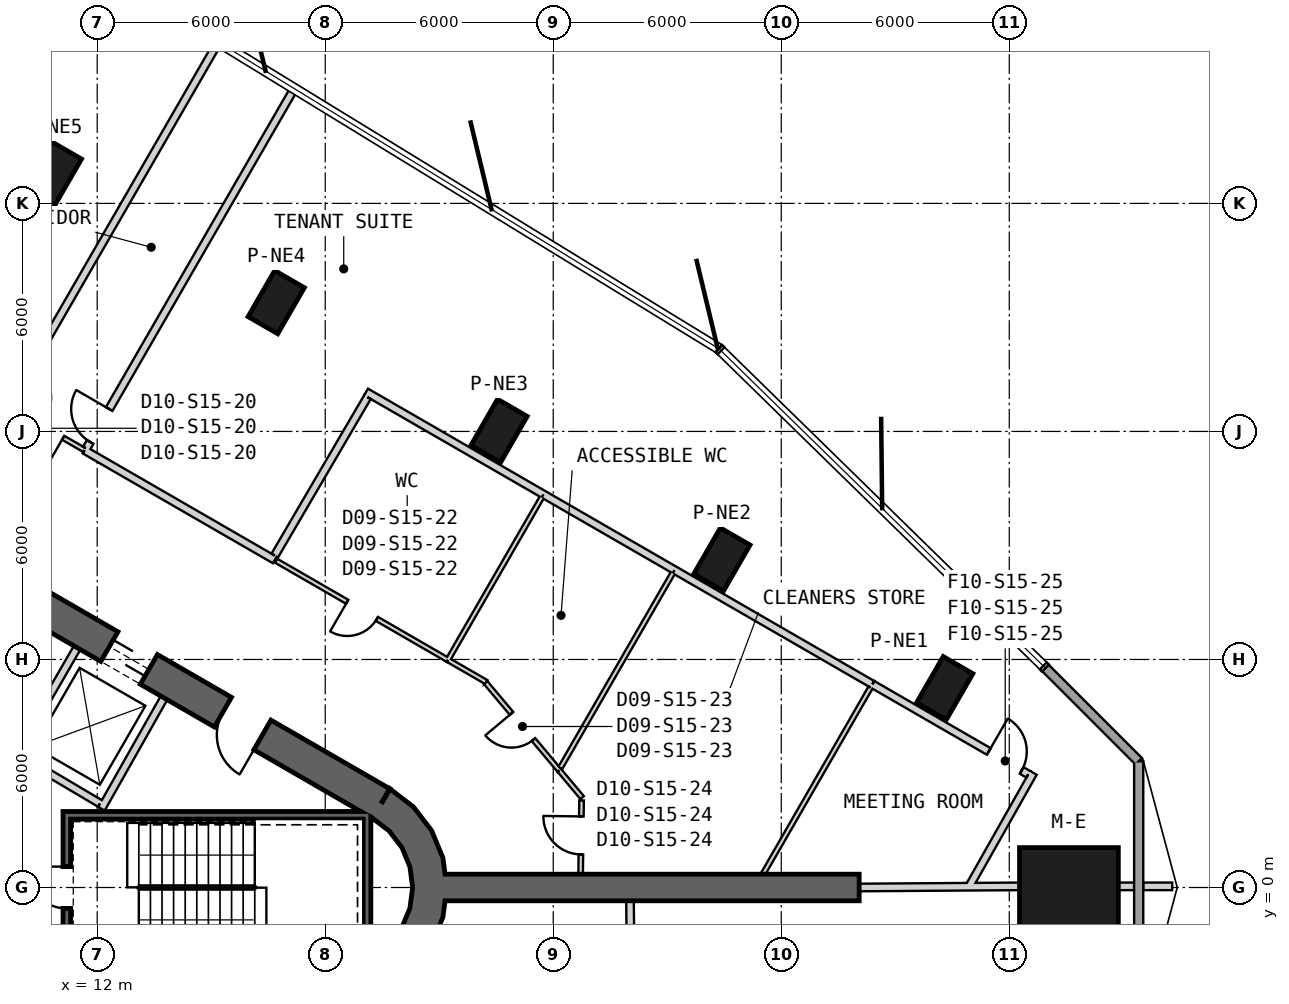
"""IFC4 building model, lengths in metres.
Left out: names, types, materials, properties, quantities, classifications, styles, units other than length and angle.
Written with IfcOpenShell. Run it as: python <this file> out.ifc"""

import sys

from ifc_helpers import new_model, si_unit, direction, frame, frame_2d, origin, origin_2d, place, context, subcontext, project, spatial, polyline, rectangle, outline, extrude, element, fill, save


model = new_model("IFC4")
c1 = context("Model", 3, precision=1e-05, world=origin(), true_north=direction((0.0, 1.0)))
c2 = subcontext(c1, "Body", "Model", "MODEL_VIEW")
j1 = project(units=[si_unit("LENGTHUNIT", "METRE"), si_unit("PLANEANGLEUNIT", "RADIAN")], contexts=[c1])
p1 = place(None, origin())
s1 = spatial("IfcSite", under=j1, at=p1, CompositionType="ELEMENT")
p2 = place(p1, origin())
s2 = spatial("IfcBuilding", under=s1, at=p2, CompositionType="ELEMENT")
p3 = place(p2, frame((0.0, 0.0, 241.2)))
s3 = spatial("IfcBuildingStorey", under=s2, at=p3, CompositionType="ELEMENT", Elevation=241.2)
p4 = place(p3, frame((37.57, 0.0, 0.0), z_axis=(0.0, 0.0, 1.0), x_axis=(1.0, 0.0, 0.0)))
e1 = element("IfcColumn", 1, at=p4, inside=s3, PredefinedType="COLUMN", context=c2, shape_type="SweptSolid", body=[
    extrude(rectangle(XDim=2.6, YDim=2.1, at=origin_2d()), origin(), (0.0, 0.0, 1.0), 4.0),
])
for number, where, z_axis, x_axis in (
    (2, (34.302, 5.245, 0.0), (0.0, 0.0, 1.0), (0.5, 0.866, 0.0)),
    (3, (28.438, 8.631, 0.0), (0.0, 0.0, 1.0), (0.5, 0.866, 0.0)),
    (4, (22.574, 12.016, 0.0), (0.0, 0.0, 1.0), (0.5, 0.866, 0.0)),
    (5, (16.71, 15.401, 0.0), (0.0, 0.0, 1.0), (0.5, 0.866, 0.0)),
    (6, (10.847, 18.787, 0.0), (0.0, 0.0, 1.0), (0.5, 0.866, 0.0)),
):
    element("IfcColumn", number, at=place(p3, frame(where, z_axis=z_axis, x_axis=x_axis)), inside=s3, PredefinedType="COLUMN", context=c2, shape_type="SweptSolid", body=[
        extrude(rectangle(XDim=1.4, YDim=0.9, at=origin_2d()), origin(), (0.0, 0.0, 1.0), 4.0),
    ])
p5 = place(p3, frame((19.475, 2.208, 0.0), z_axis=(0.0, 0.0, 1.0), x_axis=(-0.866028369851, 0.499994862586, 0.0)))
e7 = element("IfcWall", 7, at=p5, inside=s3, PredefinedType="SHEAR", context=c2, shape_type="SweptSolid", body=[
    extrude(rectangle(XDim=31.523, YDim=0.9, at=frame_2d((15.762, 0.0))), origin(), (0.0, 0.0, 1.0), 4.0),
])
p6 = place(p5, frame((7.062, 0.0, 0.0)))
e8 = element("IfcOpeningElement", 8, at=p6, cuts=e7, PredefinedType="OPENING", context=c2, shape_type="SweptSolid", body=[
    extrude(rectangle(XDim=1.2, YDim=2.4, at=frame_2d((0.6, 1.2))), frame((0.0, 0.46, 0.0), z_axis=(0.0, -1.0, 0.0), x_axis=(1.0, 0.0, 0.0)), (0.0, 0.0, 1.0), 0.92),
])
p7 = place(p5, frame((3.612, 0.0, 0.0)))
e9 = element("IfcOpeningElement", 9, at=p7, cuts=e7, PredefinedType="OPENING", context=c2, shape_type="SweptSolid", body=[
    extrude(rectangle(XDim=1.2, YDim=2.4, at=frame_2d((0.6, 1.2))), frame((0.0, 0.46, 0.0), z_axis=(0.0, -1.0, 0.0), x_axis=(1.0, 0.0, 0.0)), (0.0, 0.0, 1.0), 0.92),
])
p8 = place(p5, frame((26.712, 0.0, 0.0)))
e10 = element("IfcOpeningElement", 10, at=p8, cuts=e7, PredefinedType="OPENING", context=c2, shape_type="SweptSolid", body=[
    extrude(rectangle(XDim=1.2, YDim=2.4, at=frame_2d((0.6, 1.2))), frame((0.0, 0.46, 0.0), z_axis=(0.0, -1.0, 0.0), x_axis=(1.0, 0.0, 0.0)), (0.0, 0.0, 1.0), 0.92),
])
p9 = place(p3, origin())
e11 = element("IfcWall", 11, at=p9, inside=s3, PredefinedType="SHEAR", context=c2, shape_type="SweptSolid", body=[
    extrude(outline(polyline([(19.7, -2.598), (20.321, -2.121), (20.798, -1.5), (21.098, -0.777), (21.2, 0.0), (21.098, 0.777), (20.798, 1.5), (20.321, 2.121), (19.7, 2.598), (19.25, 1.819), (19.685, 1.485), (20.019, 1.05), (20.229, 0.543), (20.3, 0.0), (20.229, -0.543), (20.019, -1.05), (19.685, -1.485), (19.25, -1.819), (19.7, -2.598)])), origin(), (0.0, 0.0, 1.0), 4.0),
])
p10 = place(p3, frame((21.15, 0.0, 0.0), z_axis=(0.0, 0.0, 1.0), x_axis=(1.0, 0.0, 0.0)))
e12 = element("IfcWall", 12, at=p10, inside=s3, PredefinedType="SHEAR", context=c2, shape_type="SweptSolid", body=[
    extrude(rectangle(XDim=10.9, YDim=0.7, at=frame_2d((5.45, 0.0))), origin(), (0.0, 0.0, 1.0), 4.0),
])
p11 = place(p3, frame((39.406, -3.321, 0.0), z_axis=(0.0, 0.0, 1.0), x_axis=(0.0, 1.0, 0.0)))
e13 = element("IfcWall", 13, at=p11, inside=s3, PredefinedType="SOLIDWALL", context=c2, shape_type="SweptSolid", body=[
    extrude(rectangle(XDim=6.643, YDim=0.24, at=frame_2d((3.321, 0.0))), origin(), (0.0, 0.0, 1.0), 3.7),
])
p12 = place(p3, frame((39.406, 3.321, 0.0), z_axis=(0.0, 0.0, 1.0), x_axis=(-0.707106781187, 0.707106781187, 0.0)))
e14 = element("IfcWall", 14, at=p12, inside=s3, PredefinedType="SOLIDWALL", context=c2, shape_type="SweptSolid", body=[
    extrude(rectangle(XDim=3.47, YDim=0.24, at=frame_2d((1.735, 0.0))), origin(), (0.0, 0.0, 1.0), 3.7),
])
p13 = place(p3, frame((9.847, 3.495, 0.0), z_axis=(0.0, 0.0, 1.0), x_axis=(0.499984717929, 0.866034226713, 0.0)))
e15 = element("IfcWall", 15, at=p13, inside=s3, PredefinedType="PLUMBINGWALL", context=c2, shape_type="SweptSolid", body=[
    extrude(rectangle(XDim=3.25, YDim=0.2, at=frame_2d((1.625, 0.0))), origin(), (0.0, 0.0, 1.0), 3.7),
])
p14 = place(p3, frame((12.11, 2.073, 0.0), z_axis=(0.0, 0.0, 1.0), x_axis=(0.49196600604, 0.870614408852, 0.0)))
e16 = element("IfcWall", 16, at=p14, inside=s3, PredefinedType="PLUMBINGWALL", context=c2, shape_type="SweptSolid", body=[
    extrude(rectangle(XDim=3.35, YDim=0.2, at=frame_2d((1.675, 0.0))), origin(), (0.0, 0.0, 1.0), 3.7),
])
p15 = place(p3, frame((12.073, 2.211, 0.0), z_axis=(0.0, 0.0, 1.0), x_axis=(-0.860414880418, 0.509594185166, 0.0)))
e17 = element("IfcWall", 17, at=p15, inside=s3, PredefinedType="PLUMBINGWALL", context=c2, shape_type="SweptSolid", body=[
    extrude(rectangle(XDim=2.7, YDim=0.2, at=frame_2d((1.35, 0.0))), origin(), (0.0, 0.0, 1.0), 3.7),
])
p16 = place(p3, frame((19.2, 1.9, -0.3), z_axis=(0.0, 0.0, 1.0), x_axis=(-1.0, 0.0, 0.0)))
e18 = element("IfcWall", 18, at=p16, inside=s3, PredefinedType="SHEAR", context=c2, shape_type="SweptSolid", body=[
    extrude(rectangle(XDim=8.1, YDim=0.2, at=frame_2d((4.05, 0.0))), origin(), (0.0, 0.0, 1.0), 4.0),
])
p17 = place(p3, frame((19.1, -2.0, -0.3), z_axis=(0.0, 0.0, 1.0), x_axis=(0.0, 1.0, 0.0)))
e19 = element("IfcWall", 19, at=p17, inside=s3, PredefinedType="SHEAR", context=c2, shape_type="SweptSolid", body=[
    extrude(rectangle(XDim=3.8, YDim=0.2, at=frame_2d((1.9, 0.0))), origin(), (0.0, 0.0, 1.0), 4.0),
])
p18 = place(p3, frame((11.2, -1.8, -0.3), z_axis=(0.0, 0.0, 1.0), x_axis=(0.0, 1.0, 0.0)))
e20 = element("IfcWall", 20, at=p18, inside=s3, PredefinedType="SHEAR", context=c2, shape_type="SweptSolid", body=[
    extrude(rectangle(XDim=3.6, YDim=0.2, at=frame_2d((1.8, 0.0))), origin(), (0.0, 0.0, 1.0), 4.0),
])
p19 = place(p18, frame((1.25, 0.0, 0.3)))
e21 = element("IfcOpeningElement", 21, at=p19, cuts=e20, PredefinedType="OPENING", context=c2, shape_type="SweptSolid", body=[
    extrude(rectangle(XDim=1.1, YDim=2.1, at=frame_2d((0.55, 1.05))), frame((0.0, 0.11, 0.0), z_axis=(0.0, -1.0, 0.0), x_axis=(1.0, 0.0, 0.0)), (0.0, 0.0, 1.0), 0.22),
])
p20 = place(p3, frame((22.236, 5.406, 0.0), z_axis=(0.0, 0.0, 1.0), x_axis=(-0.866024722723, 0.500001179632, 0.0)))
e22 = element("IfcWall", 22, at=p20, inside=s3, PredefinedType="PARTITIONING", context=c2, shape_type="SweptSolid", body=[
    extrude(rectangle(XDim=1.163, YDim=0.12, at=frame_2d((0.581, 0.0))), origin(), (0.0, 0.0, 1.0), 3.7),
])
p21 = place(p3, frame((21.229, 5.988, 0.0), z_axis=(0.0, 0.0, 1.0), x_axis=(-0.866024383922, 0.50000176645, 0.0)))
e23 = element("IfcWall", 23, at=p21, inside=s3, PredefinedType="PARTITIONING", context=c2, shape_type="SweptSolid", body=[
    extrude(rectangle(XDim=5.221, YDim=0.12, at=frame_2d((2.61, 0.0))), origin(), (0.0, 0.0, 1.0), 2.98),
])
p22 = place(p21, frame((2.16, 0.0, 0.0)))
e24 = element("IfcOpeningElement", 24, at=p22, cuts=e23, PredefinedType="OPENING", context=c2, shape_type="SweptSolid", body=[
    extrude(rectangle(XDim=0.9, YDim=2.1, at=frame_2d((0.45, 1.05))), frame((0.0, 0.07, 0.0), z_axis=(0.0, -1.0, 0.0), x_axis=(1.0, 0.0, 0.0)), (0.0, 0.0, 1.0), 0.14),
])
p23 = place(p3, frame((11.667, 11.508, 0.0), z_axis=(0.0, 0.0, 1.0), x_axis=(-0.866053019151, 0.499952165731, 0.0)))
e25 = element("IfcWall", 25, at=p23, inside=s3, PredefinedType="PARTITIONING", context=c2, shape_type="SweptSolid", body=[
    extrude(rectangle(XDim=2.3, YDim=0.12, at=frame_2d((1.15, 0.0))), origin(), (0.0, 0.0, 1.0), 3.7),
])
p24 = place(p23, frame((0.65, 0.0, 0.0)))
e26 = element("IfcOpeningElement", 26, at=p24, cuts=e25, PredefinedType="OPENING", context=c2, shape_type="SweptSolid", body=[
    extrude(rectangle(XDim=1.0, YDim=2.1, at=frame_2d((0.5, 1.05))), frame((0.0, 0.07, 0.0), z_axis=(0.0, -1.0, 0.0), x_axis=(1.0, 0.0, 0.0)), (0.0, 0.0, 1.0), 0.14),
])
p25 = place(p3, frame((16.673, 8.618, 0.0), z_axis=(0.0, 0.0, 1.0), x_axis=(-0.866014659605, 0.500018609004, 0.0)))
e27 = element("IfcWall", 27, at=p25, inside=s3, PredefinedType="PARTITIONING", context=c2, shape_type="SweptSolid", body=[
    extrude(rectangle(XDim=5.78, YDim=0.2, at=frame_2d((2.89, 0.0))), origin(), (0.0, 0.0, 1.0), 2.98),
])
p26 = place(p3, frame((24.76, 2.365, 0.0), z_axis=(0.0, 0.0, 1.0), x_axis=(-0.642800124371, 0.766033941878, 0.0)))
e28 = element("IfcWall", 28, at=p26, inside=s3, PredefinedType="PARTITIONING", context=c2, shape_type="SweptSolid", body=[
    extrude(rectangle(XDim=0.935, YDim=0.12, at=frame_2d((0.468, 0.0))), origin(), (0.0, 0.0, 1.0), 3.7),
])
p27 = place(p3, frame((24.159, 3.082, 0.0), z_axis=(0.0, 0.0, 1.0), x_axis=(-0.642770249036, 0.766059010099, 0.0)))
e29 = element("IfcWall", 29, at=p27, inside=s3, PredefinedType="PARTITIONING", context=c2, shape_type="SweptSolid", body=[
    extrude(rectangle(XDim=3.014, YDim=0.12, at=frame_2d((1.507, 0.0))), origin(), (0.0, 0.0, 1.0), 2.88),
])
p28 = place(p27, frame((1.057, 0.0, 0.0)))
e30 = element("IfcOpeningElement", 30, at=p28, cuts=e29, PredefinedType="OPENING", context=c2, shape_type="SweptSolid", body=[
    extrude(rectangle(XDim=0.9, YDim=2.1, at=frame_2d((0.45, 1.05))), frame((0.0, 0.07, 0.0), z_axis=(0.0, -1.0, 0.0), x_axis=(1.0, 0.0, 0.0)), (0.0, 0.0, 1.0), 0.14),
])
p29 = place(p3, frame((24.721, 0.35, 0.0), z_axis=(0.0, 0.0, 1.0), x_axis=(0.012579203405, 0.999920878691, 0.0)))
e31 = element("IfcWall", 31, at=p29, inside=s3, PredefinedType="PARTITIONING", context=c2, shape_type="SweptSolid", body=[
    extrude(rectangle(XDim=1.941, YDim=0.12, at=frame_2d((0.97, 0.0))), origin(), (0.0, 0.0, 1.0), 3.7),
])
p30 = place(p29, frame((0.521, 0.0, 0.0)))
e32 = element("IfcOpeningElement", 32, at=p30, cuts=e31, PredefinedType="OPENING", context=c2, shape_type="SweptSolid", body=[
    extrude(rectangle(XDim=1.0, YDim=2.1, at=frame_2d((0.5, 1.05))), frame((0.0, 0.07, 0.0), z_axis=(0.0, -1.0, 0.0), x_axis=(1.0, 0.0, 0.0)), (0.0, 0.0, 1.0), 0.14),
])
p31 = place(p3, frame((26.047, -2.972, 0.0), z_axis=(0.0, 0.0, 1.0), x_axis=(-0.010519853563, 0.99994466481, 0.0)))
e33 = element("IfcWall", 33, at=p31, inside=s3, PredefinedType="PARTITIONING", context=c2, shape_type="SweptSolid", body=[
    extrude(rectangle(XDim=2.623, YDim=0.2, at=frame_2d((1.311, 0.0))), origin(), (0.0, 0.0, 1.0), 3.7),
])
p32 = place(p3, frame((15.187, 22.245, 0.0), z_axis=(0.0, 0.0, 1.0), x_axis=(-0.49999723543, -0.866026999904, 0.0)))
e34 = element("IfcWall", 34, at=p32, inside=s3, PredefinedType="PARTITIONING", context=c2, shape_type="SweptSolid", body=[
    extrude(rectangle(XDim=10.998, YDim=0.2, at=frame_2d((5.499, 0.0))), origin(), (0.0, 0.0, 1.0), 3.7),
])
p33 = place(p32, frame((9.798, 0.0, 0.0)))
e35 = element("IfcOpeningElement", 35, at=p33, cuts=e34, PredefinedType="OPENING", context=c2, shape_type="SweptSolid", body=[
    extrude(rectangle(XDim=1.0, YDim=2.1, at=frame_2d((0.5, 1.05))), frame((0.0, 0.11, 0.0), z_axis=(0.0, -1.0, 0.0), x_axis=(1.0, 0.0, 0.0)), (0.0, 0.0, 1.0), 0.22),
])
p34 = place(p3, frame((11.715, 11.55, 0.0), z_axis=(0.0, 0.0, 1.0), x_axis=(0.499999401607, 0.866025749266, 0.0)))
e36 = element("IfcWall", 36, at=p34, inside=s3, PredefinedType="PARTITIONING", context=c2, shape_type="SweptSolid", body=[
    extrude(rectangle(XDim=10.938, YDim=0.2, at=frame_2d((5.469, 0.0))), origin(), (0.0, 0.0, 1.0), 3.7),
])
p35 = place(p34, frame((0.2, 0.0, 0.0)))
e37 = element("IfcOpeningElement", 37, at=p35, cuts=e36, PredefinedType="OPENING", context=c2, shape_type="SweptSolid", body=[
    extrude(rectangle(XDim=1.0, YDim=2.1, at=frame_2d((0.5, 1.05))), frame((0.0, 0.11, 0.0), z_axis=(0.0, -1.0, 0.0), x_axis=(1.0, 0.0, 0.0)), (0.0, 0.0, 1.0), 0.22),
])
p36 = place(p3, frame((40.288, 0.03, 0.0), z_axis=(0.0, 0.0, 1.0), x_axis=(-1.0, 0.0, 0.0)))
e38 = element("IfcWall", 38, at=p36, inside=s3, PredefinedType="PARTITIONING", context=c2, shape_type="SweptSolid", body=[
    extrude(rectangle(XDim=0.762, YDim=0.2, at=frame_2d((0.381, 0.0))), origin(), (0.0, 0.0, 1.0), 3.7),
])
p37 = place(p3, frame((39.286, 0.03, 0.0), z_axis=(0.0, 0.0, 1.0), x_axis=(-1.0, 0.0, 0.0)))
e39 = element("IfcWall", 39, at=p37, inside=s3, PredefinedType="PARTITIONING", context=c2, shape_type="SweptSolid", body=[
    extrude(rectangle(XDim=0.416, YDim=0.2, at=frame_2d((0.208, 0.0))), origin(), (0.0, 0.0, 1.0), 3.7),
])
p38 = place(p3, frame((36.27, 0.03, 0.0), z_axis=(0.0, 0.0, 1.0), x_axis=(-0.999974676399, -0.007116639773, 0.0)))
e40 = element("IfcWall", 40, at=p38, inside=s3, PredefinedType="PARTITIONING", context=c2, shape_type="SweptSolid", body=[
    extrude(rectangle(XDim=4.219, YDim=0.2, at=frame_2d((2.11, 0.0))), origin(), (0.0, 0.0, 1.0), 3.27),
])
p39 = place(p3, frame((19.075, 13.039, 0.0), z_axis=(0.0, 0.0, 1.0), x_axis=(0.866038526581, -0.499977269961, 0.0)))
e41 = element("IfcWall", 41, at=p39, inside=s3, PredefinedType="PARTITIONING", context=c2, shape_type="SweptSolid", body=[
    extrude(rectangle(XDim=5.391, YDim=0.2, at=frame_2d((2.695, 0.0))), origin(), (0.0, 0.0, 1.0), 2.98),
])
p40 = place(p3, frame((23.744, 10.344, 0.0), z_axis=(0.0, 0.0, 1.0), x_axis=(0.86599666964, -0.500049765695, 0.0)))
e42 = element("IfcWall", 42, at=p40, inside=s3, PredefinedType="PARTITIONING", context=c2, shape_type="SweptSolid", body=[
    extrude(rectangle(XDim=3.981, YDim=0.2, at=frame_2d((1.991, 0.0))), origin(), (0.0, 0.0, 1.0), 2.98),
])
p41 = place(p3, frame((27.192, 8.353, 0.0), z_axis=(0.0, 0.0, 1.0), x_axis=(0.866025306899, -0.50000016781, 0.0)))
e43 = element("IfcWall", 43, at=p41, inside=s3, PredefinedType="PARTITIONING", context=c2, shape_type="SweptSolid", body=[
    extrude(rectangle(XDim=6.012, YDim=0.2, at=frame_2d((3.006, 0.0))), origin(), (0.0, 0.0, 1.0), 2.98),
])
p42 = place(p3, frame((32.398, 5.347, 0.0), z_axis=(0.0, 0.0, 1.0), x_axis=(0.866036218949, -0.499981267118, 0.0)))
e44 = element("IfcWall", 44, at=p42, inside=s3, PredefinedType="PARTITIONING", context=c2, shape_type="SweptSolid", body=[
    extrude(rectangle(XDim=4.736, YDim=0.2, at=frame_2d((2.368, 0.0))), origin(), (0.0, 0.0, 1.0), 2.88),
])
p43 = place(p42, frame((3.536, 0.0, 0.0)))
e45 = element("IfcOpeningElement", 45, at=p43, cuts=e44, PredefinedType="OPENING", context=c2, shape_type="SweptSolid", body=[
    extrude(rectangle(XDim=1.0, YDim=2.1, at=frame_2d((0.5, 1.05))), frame((0.0, 0.11, 0.0), z_axis=(0.0, -1.0, 0.0), x_axis=(1.0, 0.0, 0.0)), (0.0, 0.0, 1.0), 0.22),
])
p44 = place(p3, frame((19.111, 12.903, 0.0), z_axis=(0.0, 0.0, 1.0), x_axis=(-0.505159000856, -0.863026293837, 0.0)))
e46 = element("IfcWall", 46, at=p44, inside=s3, PredefinedType="PARTITIONING", context=c2, shape_type="SweptSolid", body=[
    extrude(rectangle(XDim=4.83, YDim=0.2, at=frame_2d((2.415, 0.0))), origin(), (0.0, 0.0, 1.0), 2.98),
])
p45 = place(p3, frame((34.93, 0.0, 0.0), z_axis=(0.0, 0.0, 1.0), x_axis=(0.49225689493, 0.870449969495, 0.0)))
e47 = element("IfcWall", 47, at=p45, inside=s3, PredefinedType="PARTITIONING", context=c2, shape_type="SweptSolid", body=[
    extrude(rectangle(XDim=3.465, YDim=0.2, at=frame_2d((1.733, 0.0))), origin(), (0.0, 0.0, 1.0), 3.27),
])
p46 = place(p3, frame((21.259, 6.04, 0.0), z_axis=(0.0, 0.0, 1.0), x_axis=(0.500010305712, 0.866019453697, 0.0)))
e48 = element("IfcWall", 48, at=p46, inside=s3, PredefinedType="PARTITIONING", context=c2, shape_type="SweptSolid", body=[
    extrude(rectangle(XDim=4.87, YDim=0.12, at=frame_2d((2.435, 0.0))), origin(), (0.0, 0.0, 1.0), 2.98),
])
p47 = place(p3, frame((27.142, 8.267, 0.0), z_axis=(0.0, 0.0, 1.0), x_axis=(-0.499992838882, -0.866029538218, 0.0)))
e49 = element("IfcWall", 49, at=p47, inside=s3, PredefinedType="PARTITIONING", context=c2, shape_type="SweptSolid", body=[
    extrude(rectangle(XDim=5.914, YDim=0.12, at=frame_2d((2.957, 0.0))), origin(), (0.0, 0.0, 1.0), 2.88),
])
p48 = place(p3, frame((29.518, 0.35, 0.0), z_axis=(0.0, 0.0, 1.0), x_axis=(0.499424120211, 0.866357632939, 0.0)))
e50 = element("IfcWall", 50, at=p48, inside=s3, PredefinedType="PARTITIONING", context=c2, shape_type="SweptSolid", body=[
    extrude(rectangle(XDim=5.668, YDim=0.12, at=frame_2d((2.834, 0.0))), origin(), (0.0, 0.0, 1.0), 2.88),
])
p49 = place(p19, origin())
e51 = element("IfcDoor", 51, at=p49, inside=s3, OperationType="SINGLE_SWING_RIGHT", PredefinedType="USERDEFINED", context=c2, shape_type="SweptSolid", body=[
    extrude(rectangle(XDim=1.1, YDim=2.1, at=frame_2d((0.55, 1.05))), frame((0.0, 0.025, 0.0), z_axis=(0.0, -1.0, 0.0), x_axis=(1.0, 0.0, 0.0)), (0.0, 0.0, 1.0), 0.05),
])
fill(e21, e51)
p50 = place(p24, origin())
e52 = element("IfcDoor", 52, at=p50, inside=s3, OperationType="SINGLE_SWING_LEFT", PredefinedType="NOTDEFINED", context=c2, shape_type="SweptSolid", body=[
    extrude(rectangle(XDim=1.0, YDim=2.1, at=frame_2d((0.5, 1.05))), frame((0.0, 0.025, 0.0), z_axis=(0.0, -1.0, 0.0), x_axis=(1.0, 0.0, 0.0)), (0.0, 0.0, 1.0), 0.05),
])
fill(e26, e52)
p51 = place(p22, origin())
e53 = element("IfcDoor", 53, at=p51, inside=s3, OperationType="SINGLE_SWING_RIGHT", PredefinedType="NOTDEFINED", context=c2, shape_type="SweptSolid", body=[
    extrude(rectangle(XDim=0.9, YDim=2.1, at=frame_2d((0.45, 1.05))), frame((0.0, 0.025, 0.0), z_axis=(0.0, -1.0, 0.0), x_axis=(1.0, 0.0, 0.0)), (0.0, 0.0, 1.0), 0.05),
])
fill(e24, e53)
p52 = place(p28, origin())
e54 = element("IfcDoor", 54, at=p52, inside=s3, OperationType="SINGLE_SWING_RIGHT", PredefinedType="NOTDEFINED", context=c2, shape_type="SweptSolid", body=[
    extrude(rectangle(XDim=0.9, YDim=2.1, at=frame_2d((0.45, 1.05))), frame((0.0, 0.025, 0.0), z_axis=(0.0, -1.0, 0.0), x_axis=(1.0, 0.0, 0.0)), (0.0, 0.0, 1.0), 0.05),
])
fill(e30, e54)
p53 = place(p30, origin())
e55 = element("IfcDoor", 55, at=p53, inside=s3, OperationType="SINGLE_SWING_RIGHT", PredefinedType="NOTDEFINED", context=c2, shape_type="SweptSolid", body=[
    extrude(rectangle(XDim=1.0, YDim=2.1, at=frame_2d((0.5, 1.05))), frame((0.0, 0.025, 0.0), z_axis=(0.0, -1.0, 0.0), x_axis=(1.0, 0.0, 0.0)), (0.0, 0.0, 1.0), 0.05),
])
fill(e32, e55)
p54 = place(p43, origin())
e56 = element("IfcDoor", 56, at=p54, inside=s3, OperationType="SINGLE_SWING_RIGHT", PredefinedType="USERDEFINED", context=c2, shape_type="SweptSolid", body=[
    extrude(rectangle(XDim=1.0, YDim=2.1, at=frame_2d((0.5, 1.05))), frame((0.0, 0.025, 0.0), z_axis=(0.0, -1.0, 0.0), x_axis=(1.0, 0.0, 0.0)), (0.0, 0.0, 1.0), 0.05),
])
fill(e45, e56)
p55 = place(p35, origin())
e57 = element("IfcDoor", 57, at=p55, inside=s3, OperationType="SINGLE_SWING_RIGHT", PredefinedType="USERDEFINED", context=c2, shape_type="SweptSolid", body=[
    extrude(rectangle(XDim=1.0, YDim=2.1, at=frame_2d((0.5, 1.05))), frame((0.0, 0.025, 0.0), z_axis=(0.0, -1.0, 0.0), x_axis=(1.0, 0.0, 0.0)), (0.0, 0.0, 1.0), 0.05),
])
fill(e37, e57)
p56 = place(p6, origin())
e58 = element("IfcDoor", 58, at=p56, inside=s3, OperationType="SLIDING_TO_LEFT", PredefinedType="USERDEFINED", context=c2, shape_type="SweptSolid", body=[
    extrude(rectangle(XDim=1.2, YDim=2.4, at=frame_2d((0.6, 1.2))), frame((0.0, 0.025, 0.0), z_axis=(0.0, -1.0, 0.0), x_axis=(1.0, 0.0, 0.0)), (0.0, 0.0, 1.0), 0.05),
])
fill(e8, e58)
p57 = place(p7, origin())
e59 = element("IfcDoor", 59, at=p57, inside=s3, OperationType="SINGLE_SWING_RIGHT", PredefinedType="USERDEFINED", context=c2, shape_type="SweptSolid", body=[
    extrude(rectangle(XDim=1.2, YDim=2.4, at=frame_2d((0.6, 1.2))), frame((0.0, 0.025, 0.0), z_axis=(0.0, -1.0, 0.0), x_axis=(1.0, 0.0, 0.0)), (0.0, 0.0, 1.0), 0.05),
])
fill(e9, e59)
save(model, sys.argv[1])
